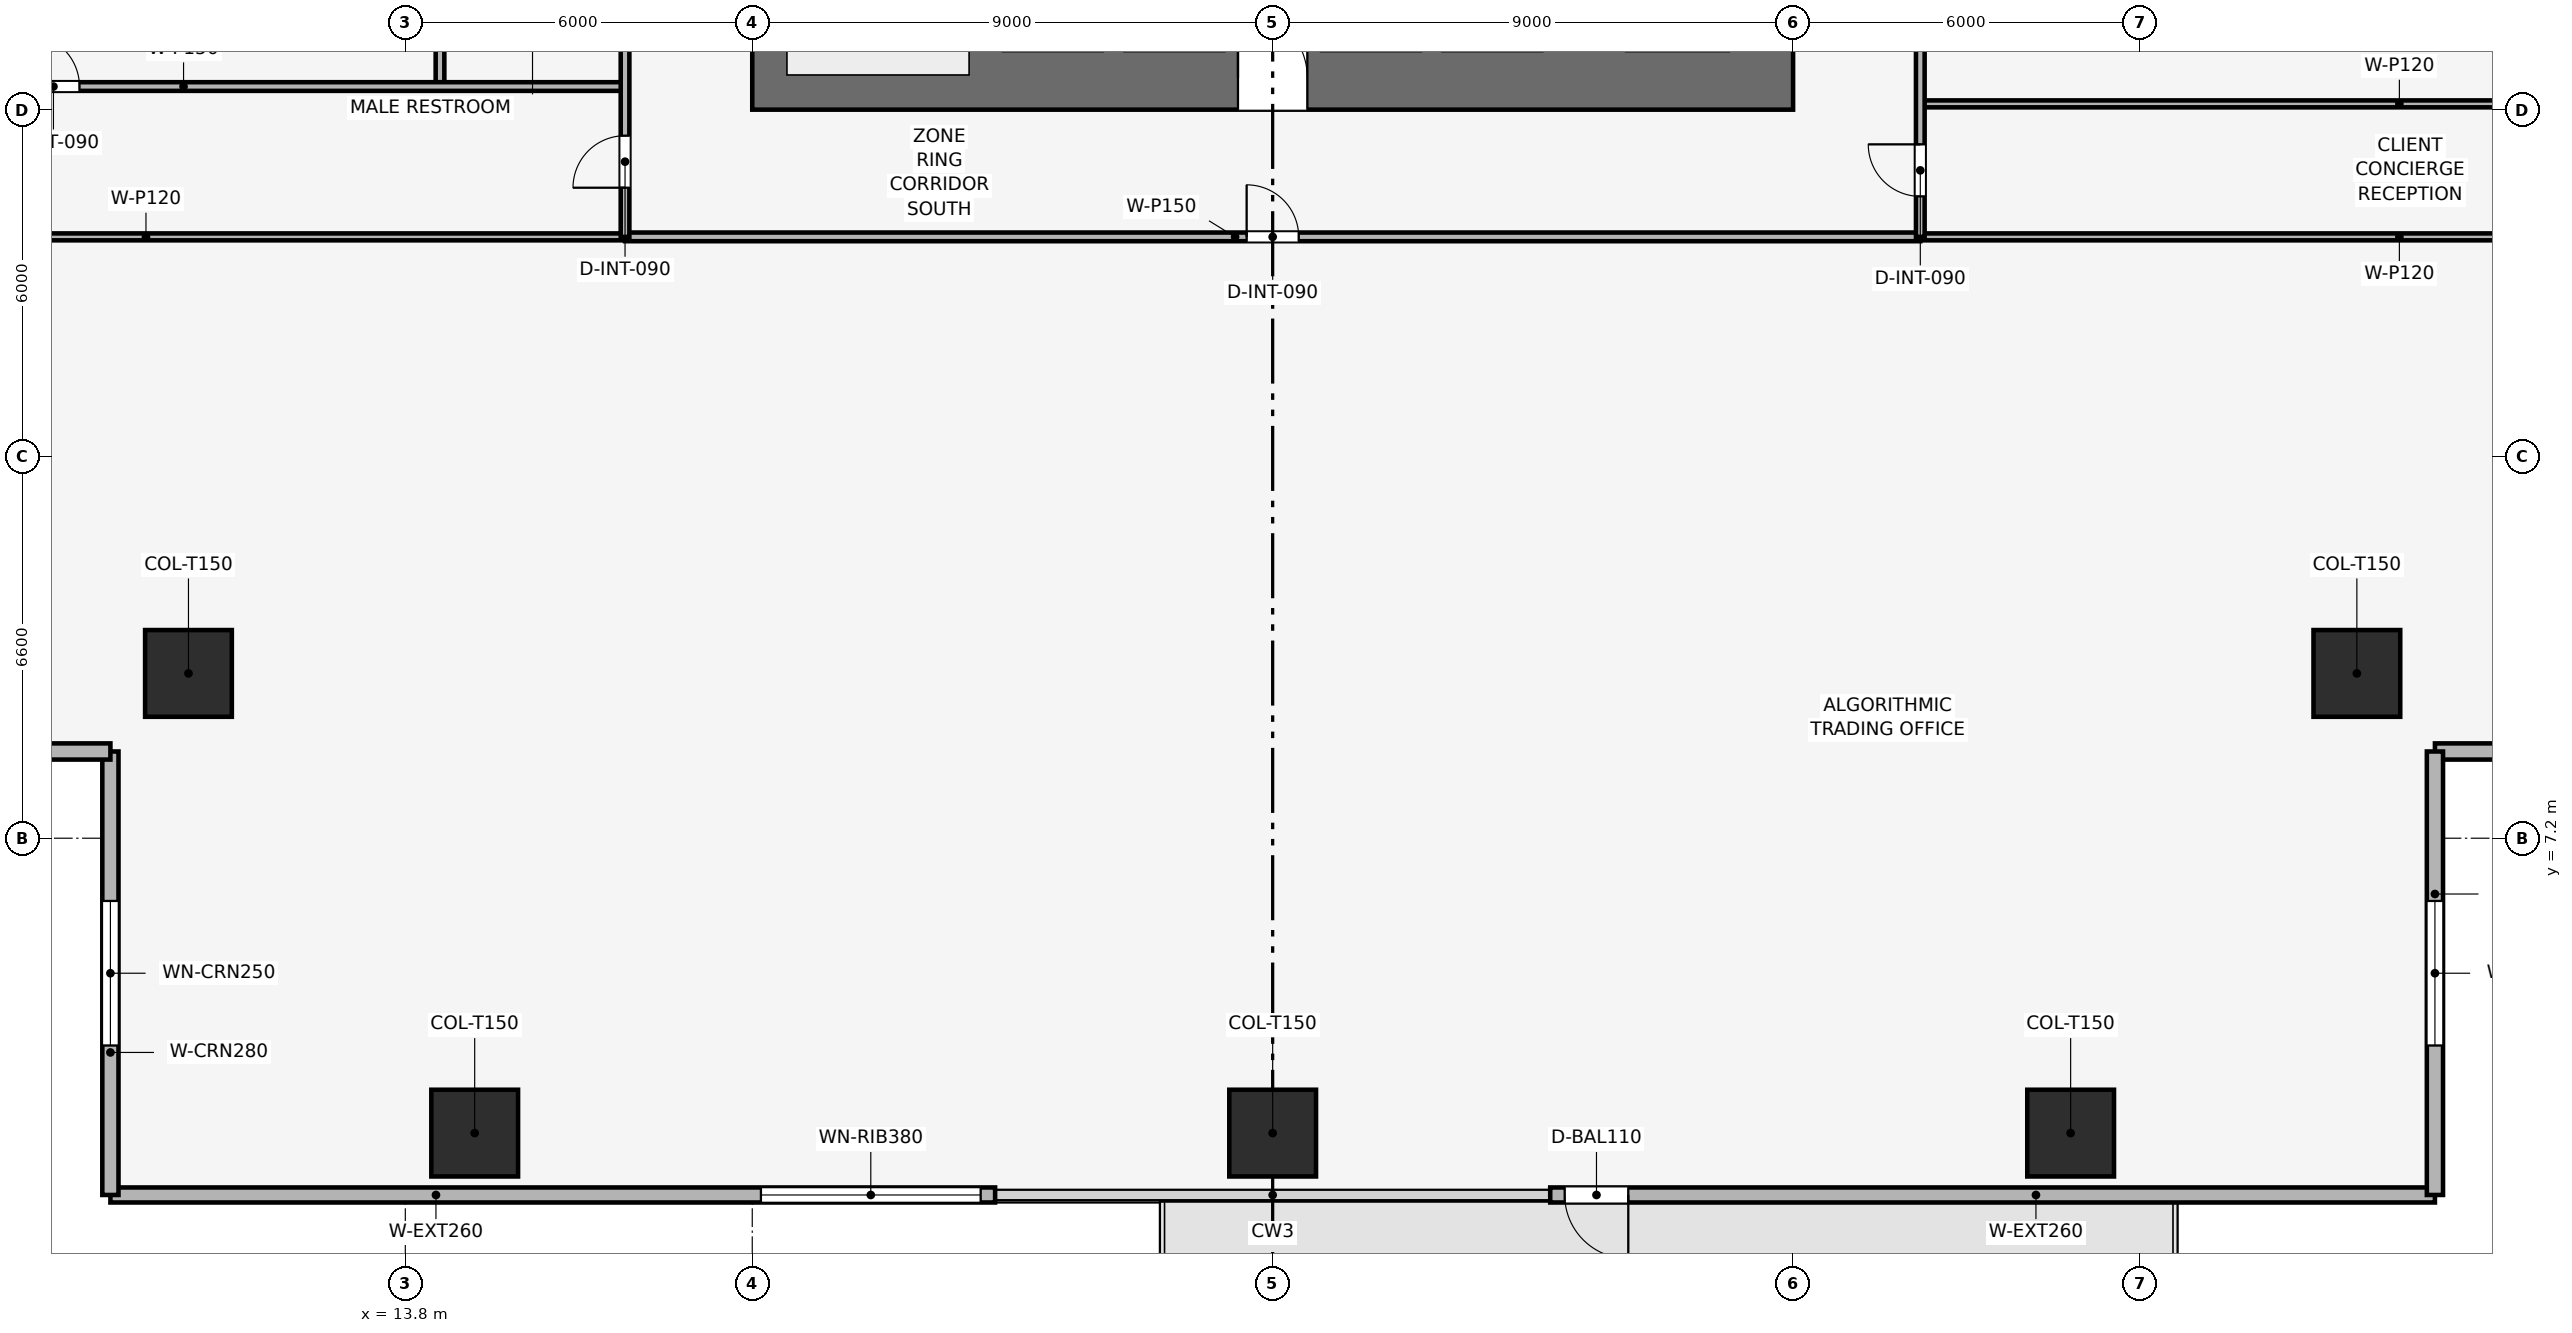
"""IFC4 building model, lengths in metres.
Left out: names, types, materials, properties, quantities, classifications, styles, units other than length and angle.
Written with IfcOpenShell. Run it as: python <this file> out.ifc"""

import sys

from ifc_helpers import new_model, si_unit, direction, frame, frame_2d, origin, origin_2d, place, context, subcontext, project, spatial, rectangle, extrude, element, fill, save


model = new_model("IFC4")
c1 = context("Model", 3, precision=1e-05, world=origin(), true_north=direction((0.0, 1.0)))
c2 = subcontext(c1, "Body", "Model", "MODEL_VIEW")
j1 = project(units=[si_unit("LENGTHUNIT", "METRE"), si_unit("PLANEANGLEUNIT", "RADIAN")], contexts=[c1])
p1 = place(None, origin())
s1 = spatial("IfcSite", under=j1, at=p1, CompositionType="ELEMENT")
p2 = place(p1, origin())
s2 = spatial("IfcBuilding", under=s1, at=p2, CompositionType="ELEMENT")
p3 = place(p2, frame((0.0, 0.0, 84.6)))
s3 = spatial("IfcBuildingStorey", under=s2, at=p3, CompositionType="ELEMENT", Elevation=84.6)
p4 = place(p3, frame((19.8, 20.35, 0.0), z_axis=(0.0, 0.0, 1.0), x_axis=(1.0, 0.0, 0.0)))
e1 = element("IfcWall", 1, at=p4, inside=s3, PredefinedType="SHEAR", context=c2, shape_type="SweptSolid", body=[
    extrude(rectangle(XDim=18.0, YDim=1.1, at=frame_2d((9.0, 0.0))), origin(), (0.0, 0.0, 1.0), 3.9),
])
p5 = place(p4, frame((8.4, 0.0, 0.0)))
e2 = element("IfcOpeningElement", 2, at=p5, cuts=e1, PredefinedType="OPENING", context=c2, shape_type="SweptSolid", body=[
    extrude(rectangle(XDim=1.2, YDim=2.2, at=frame_2d((0.6, 1.1))), frame((0.0, 0.56, 0.0), z_axis=(0.0, -1.0, 0.0), x_axis=(1.0, 0.0, 0.0)), (0.0, 0.0, 1.0), 1.12),
])
for number, where, z_axis, x_axis in (
    (3, (15.0, 2.1, 0.003), (0.0, 0.0, 1.0), (1.0, 0.0, 0.0)),
    (4, (28.8, 2.1, 0.003), (0.0, 0.0, 1.0), (1.0, 0.0, 0.0)),
    (5, (42.6, 2.1, 0.003), (0.0, 0.0, 1.0), (1.0, 0.0, 0.0)),
    (6, (10.05, 10.05, 0.003), (0.0, 0.0, 1.0), (1.0, 0.0, 0.0)),
    (7, (47.55, 10.05, 0.003), (0.0, 0.0, 1.0), (1.0, 0.0, 0.0)),
):
    element("IfcColumn", number, at=place(p3, frame(where, z_axis=z_axis, x_axis=x_axis)), inside=s3, PredefinedType="COLUMN", context=c2, shape_type="SweptSolid", body=[
        extrude(rectangle(XDim=1.5, YDim=1.5, at=origin_2d()), origin(), (0.0, 0.0, 1.0), 3.644),
    ])
p6 = place(p3, frame((48.9, 1.03, 0.0), z_axis=(0.0, 0.0, 1.0), x_axis=(-1.0, 0.0, 0.0)))
e8 = element("IfcWall", 8, at=p6, inside=s3, PredefinedType="SOLIDWALL", context=c2, shape_type="SweptSolid", body=[
    extrude(rectangle(XDim=15.3, YDim=0.26, at=frame_2d((7.65, 0.0))), origin(), (0.0, 0.0, 1.0), 3.65),
])
p7 = place(p6, frame((13.95, 0.0, 0.0)))
e9 = element("IfcOpeningElement", 9, at=p7, cuts=e8, PredefinedType="OPENING", context=c2, shape_type="SweptSolid", body=[
    extrude(rectangle(XDim=1.1, YDim=2.2, at=frame_2d((0.55, 1.1))), frame((0.0, 0.14, 0.0), z_axis=(0.0, -1.0, 0.0), x_axis=(1.0, 0.0, 0.0)), (0.0, 0.0, 1.0), 0.28),
])
p8 = place(p3, frame((24.0, 1.03, 0.0), z_axis=(0.0, 0.0, 1.0), x_axis=(-1.0, 0.0, 0.0)))
e10 = element("IfcWall", 10, at=p8, inside=s3, PredefinedType="SOLIDWALL", context=c2, shape_type="SweptSolid", body=[
    extrude(rectangle(XDim=15.3, YDim=0.26, at=frame_2d((7.65, 0.0))), origin(), (0.0, 0.0, 1.0), 3.65),
])
p9 = place(p8, frame((0.25, 0.0, 0.9)))
e11 = element("IfcOpeningElement", 11, at=p9, cuts=e10, PredefinedType="OPENING", context=c2, shape_type="SweptSolid", body=[
    extrude(rectangle(XDim=3.8, YDim=1.9, at=frame_2d((1.9, 0.95))), frame((0.0, 0.14, 0.0), z_axis=(0.0, -1.0, 0.0), x_axis=(1.0, 0.0, 0.0)), (0.0, 0.0, 1.0), 0.28),
])
p10 = place(p3, frame((8.7, 1.03, 0.0), z_axis=(0.0, 0.0, 1.0), x_axis=(0.0, 1.0, 0.0)))
e12 = element("IfcWall", 12, at=p10, inside=s3, PredefinedType="SOLIDWALL", context=c2, shape_type="SweptSolid", body=[
    extrude(rectangle(XDim=7.67, YDim=0.28, at=frame_2d((3.835, 0.0))), origin(), (0.0, 0.0, 1.0), 3.65),
])
p11 = place(p10, frame((2.585, 0.0, 0.9)))
e13 = element("IfcOpeningElement", 13, at=p11, cuts=e12, PredefinedType="OPENING", context=c2, shape_type="SweptSolid", body=[
    extrude(rectangle(XDim=2.5, YDim=1.9, at=frame_2d((1.25, 0.95))), frame((0.0, 0.15, 0.0), z_axis=(0.0, -1.0, 0.0), x_axis=(1.0, 0.0, 0.0)), (0.0, 0.0, 1.0), 0.3),
])
p12 = place(p3, frame((8.7, 8.7, 0.0), z_axis=(0.0, 0.0, 1.0), x_axis=(-1.0, 0.0, 0.0)))
e14 = element("IfcWall", 14, at=p12, inside=s3, PredefinedType="SOLIDWALL", context=c2, shape_type="SweptSolid", body=[
    extrude(rectangle(XDim=7.67, YDim=0.28, at=frame_2d((3.835, 0.0))), origin(), (0.0, 0.0, 1.0), 3.65),
])
p13 = place(p12, frame((2.585, 0.0, 0.9)))
e15 = element("IfcOpeningElement", 15, at=p13, cuts=e14, PredefinedType="OPENING", context=c2, shape_type="SweptSolid", body=[
    extrude(rectangle(XDim=2.5, YDim=1.9, at=frame_2d((1.25, 0.95))), frame((0.0, 0.15, 0.0), z_axis=(0.0, -1.0, 0.0), x_axis=(1.0, 0.0, 0.0)), (0.0, 0.0, 1.0), 0.3),
])
p14 = place(p3, frame((56.57, 8.7, 0.0), z_axis=(0.0, 0.0, 1.0), x_axis=(-1.0, 0.0, 0.0)))
e16 = element("IfcWall", 16, at=p14, inside=s3, PredefinedType="SOLIDWALL", context=c2, shape_type="SweptSolid", body=[
    extrude(rectangle(XDim=7.67, YDim=0.28, at=frame_2d((3.835, 0.0))), origin(), (0.0, 0.0, 1.0), 3.65),
])
p15 = place(p14, frame((2.585, 0.0, 0.9)))
e17 = element("IfcOpeningElement", 17, at=p15, cuts=e16, PredefinedType="OPENING", context=c2, shape_type="SweptSolid", body=[
    extrude(rectangle(XDim=2.5, YDim=1.9, at=frame_2d((1.25, 0.95))), frame((0.0, 0.15, 0.0), z_axis=(0.0, -1.0, 0.0), x_axis=(1.0, 0.0, 0.0)), (0.0, 0.0, 1.0), 0.3),
])
p16 = place(p3, frame((48.9, 8.7, 0.0), z_axis=(0.0, 0.0, 1.0), x_axis=(0.0, -1.0, 0.0)))
e18 = element("IfcWall", 18, at=p16, inside=s3, PredefinedType="SOLIDWALL", context=c2, shape_type="SweptSolid", body=[
    extrude(rectangle(XDim=7.67, YDim=0.28, at=frame_2d((3.835, 0.0))), origin(), (0.0, 0.0, 1.0), 3.65),
])
p17 = place(p16, frame((2.585, 0.0, 0.9)))
e19 = element("IfcOpeningElement", 19, at=p17, cuts=e18, PredefinedType="OPENING", context=c2, shape_type="SweptSolid", body=[
    extrude(rectangle(XDim=2.5, YDim=1.9, at=frame_2d((1.25, 0.95))), frame((0.0, 0.15, 0.0), z_axis=(0.0, -1.0, 0.0), x_axis=(1.0, 0.0, 0.0)), (0.0, 0.0, 1.0), 0.3),
])
for number, where, z_axis, x_axis in (
    (20, (1.03, 17.6, 0.0), (0.0, 0.0, 1.0), (1.0, 0.0, 0.0)),
    (21, (40.0, 17.6, 0.0), (0.0, 0.0, 1.0), (1.0, 0.0, 0.0)),
):
    element("IfcWall", number, at=place(p3, frame(where, z_axis=z_axis, x_axis=x_axis)), inside=s3, PredefinedType="PARTITIONING", context=c2, shape_type="SweptSolid", body=[
        extrude(rectangle(XDim=16.57, YDim=0.12, at=frame_2d((8.285, 0.0))), origin(), (0.0, 0.0, 1.0), 2.935),
    ])
p18 = place(p3, frame((14.4, 20.2, 0.0), z_axis=(0.0, 0.0, 1.0), x_axis=(0.0, 1.0, 0.0)))
e22 = element("IfcWall", 22, at=p18, inside=s3, PredefinedType="PARTITIONING", context=c2, shape_type="SweptSolid", body=[
    extrude(rectangle(XDim=8.4, YDim=0.15, at=frame_2d((4.2, 0.0))), origin(), (0.0, 0.0, 1.0), 3.085),
])
p19 = place(p3, frame((1.03, 20.2, 0.0), z_axis=(0.0, 0.0, 1.0), x_axis=(1.0, 0.0, 0.0)))
e23 = element("IfcWall", 23, at=p19, inside=s3, PredefinedType="PARTITIONING", context=c2, shape_type="SweptSolid", body=[
    extrude(rectangle(XDim=16.57, YDim=0.15, at=frame_2d((8.285, 0.0))), origin(), (0.0, 0.0, 1.0), 2.935),
])
p20 = place(p19, frame((6.235, 0.0, 0.0)))
e24 = element("IfcOpeningElement", 24, at=p20, cuts=e23, PredefinedType="OPENING", context=c2, shape_type="SweptSolid", body=[
    extrude(rectangle(XDim=0.9, YDim=2.1, at=frame_2d((0.45, 1.05))), frame((0.0, 0.085, 0.0), z_axis=(0.0, -1.0, 0.0), x_axis=(1.0, 0.0, 0.0)), (0.0, 0.0, 1.0), 0.17),
])
p21 = place(p3, frame((40.0, 19.9, 0.0), z_axis=(0.0, 0.0, 1.0), x_axis=(1.0, 0.0, 0.0)))
e25 = element("IfcWall", 25, at=p21, inside=s3, PredefinedType="PARTITIONING", context=c2, shape_type="SweptSolid", body=[
    extrude(rectangle(XDim=16.57, YDim=0.12, at=frame_2d((8.285, 0.0))), origin(), (0.0, 0.0, 1.0), 2.935),
])
p22 = place(p3, frame((17.6, 17.6, 0.0), z_axis=(0.0, 0.0, 1.0), x_axis=(1.0, 0.0, 0.0)))
e26 = element("IfcWall", 26, at=p22, inside=s3, PredefinedType="PARTITIONING", context=c2, shape_type="SweptSolid", body=[
    extrude(rectangle(XDim=22.4, YDim=0.15, at=frame_2d((11.2, 0.0))), origin(), (0.0, 0.0, 1.0), 3.085),
])
p23 = place(p22, frame((10.75, 0.0, 0.0)))
e27 = element("IfcOpeningElement", 27, at=p23, cuts=e26, PredefinedType="OPENING", context=c2, shape_type="SweptSolid", body=[
    extrude(rectangle(XDim=0.9, YDim=2.1, at=frame_2d((0.45, 1.05))), frame((0.0, 0.085, 0.0), z_axis=(0.0, -1.0, 0.0), x_axis=(1.0, 0.0, 0.0)), (0.0, 0.0, 1.0), 0.17),
])
p24 = place(p3, frame((17.6, 17.6, 0.0), z_axis=(0.0, 0.0, 1.0), x_axis=(0.0, 1.0, 0.0)))
e28 = element("IfcWall", 28, at=p24, inside=s3, PredefinedType="PARTITIONING", context=c2, shape_type="SweptSolid", body=[
    extrude(rectangle(XDim=22.4, YDim=0.15, at=frame_2d((11.2, 0.0))), origin(), (0.0, 0.0, 1.0), 3.085),
])
p25 = place(p24, frame((0.85, 0.0, 0.0)))
e29 = element("IfcOpeningElement", 29, at=p25, cuts=e28, PredefinedType="OPENING", context=c2, shape_type="SweptSolid", body=[
    extrude(rectangle(XDim=0.9, YDim=2.1, at=frame_2d((0.45, 1.05))), frame((0.0, 0.085, 0.0), z_axis=(0.0, -1.0, 0.0), x_axis=(1.0, 0.0, 0.0)), (0.0, 0.0, 1.0), 0.17),
])
p26 = place(p24, frame((3.55, 0.0, 0.0)))
e30 = element("IfcOpeningElement", 30, at=p26, cuts=e28, PredefinedType="OPENING", context=c2, shape_type="SweptSolid", body=[
    extrude(rectangle(XDim=0.9, YDim=2.1, at=frame_2d((0.45, 1.05))), frame((0.0, 0.085, 0.0), z_axis=(0.0, -1.0, 0.0), x_axis=(1.0, 0.0, 0.0)), (0.0, 0.0, 1.0), 0.17),
])
p27 = place(p24, frame((6.45, 0.0, 0.0)))
e31 = element("IfcOpeningElement", 31, at=p27, cuts=e28, PredefinedType="OPENING", context=c2, shape_type="SweptSolid", body=[
    extrude(rectangle(XDim=0.9, YDim=2.1, at=frame_2d((0.45, 1.05))), frame((0.0, 0.085, 0.0), z_axis=(0.0, -1.0, 0.0), x_axis=(1.0, 0.0, 0.0)), (0.0, 0.0, 1.0), 0.17),
])
p28 = place(p24, frame((9.2, 0.0, 0.0)))
e32 = element("IfcOpeningElement", 32, at=p28, cuts=e28, PredefinedType="OPENING", context=c2, shape_type="SweptSolid", body=[
    extrude(rectangle(XDim=0.95, YDim=2.1, at=frame_2d((0.475, 1.05))), frame((0.0, 0.085, 0.0), z_axis=(0.0, -1.0, 0.0), x_axis=(1.0, 0.0, 0.0)), (0.0, 0.0, 1.0), 0.17),
])
p29 = place(p24, frame((16.25, 0.0, 0.0)))
e33 = element("IfcOpeningElement", 33, at=p29, cuts=e28, PredefinedType="OPENING", context=c2, shape_type="SweptSolid", body=[
    extrude(rectangle(XDim=0.9, YDim=2.1, at=frame_2d((0.45, 1.05))), frame((0.0, 0.085, 0.0), z_axis=(0.0, -1.0, 0.0), x_axis=(1.0, 0.0, 0.0)), (0.0, 0.0, 1.0), 0.17),
])
p30 = place(p3, frame((40.0, 17.6, 0.0), z_axis=(0.0, 0.0, 1.0), x_axis=(0.0, 1.0, 0.0)))
e34 = element("IfcWall", 34, at=p30, inside=s3, PredefinedType="PARTITIONING", context=c2, shape_type="SweptSolid", body=[
    extrude(rectangle(XDim=22.4, YDim=0.15, at=frame_2d((11.2, 0.0))), origin(), (0.0, 0.0, 1.0), 3.085),
])
p31 = place(p30, frame((0.7, 0.0, 0.0)))
e35 = element("IfcOpeningElement", 35, at=p31, cuts=e34, PredefinedType="OPENING", context=c2, shape_type="SweptSolid", body=[
    extrude(rectangle(XDim=0.9, YDim=2.1, at=frame_2d((0.45, 1.05))), frame((0.0, 0.085, 0.0), z_axis=(0.0, -1.0, 0.0), x_axis=(1.0, 0.0, 0.0)), (0.0, 0.0, 1.0), 0.17),
])
p32 = place(p30, frame((6.404, 0.0, 0.0)))
e36 = element("IfcOpeningElement", 36, at=p32, cuts=e34, PredefinedType="OPENING", context=c2, shape_type="SweptSolid", body=[
    extrude(rectangle(XDim=0.9, YDim=2.1, at=frame_2d((0.45, 1.05))), frame((0.0, 0.085, 0.0), z_axis=(0.0, -1.0, 0.0), x_axis=(1.0, 0.0, 0.0)), (0.0, 0.0, 1.0), 0.17),
])
p33 = place(p30, frame((16.454, 0.0, 0.0)))
e37 = element("IfcOpeningElement", 37, at=p33, cuts=e34, PredefinedType="OPENING", context=c2, shape_type="SweptSolid", body=[
    extrude(rectangle(XDim=0.9, YDim=2.1, at=frame_2d((0.45, 1.05))), frame((0.0, 0.085, 0.0), z_axis=(0.0, -1.0, 0.0), x_axis=(1.0, 0.0, 0.0)), (0.0, 0.0, 1.0), 0.17),
])
p34 = place(p7, origin())
e38 = element("IfcDoor", 38, at=p34, inside=s3, OperationType="SINGLE_SWING_LEFT", PredefinedType="DOOR", context=c2, shape_type="SweptSolid", body=[
    extrude(rectangle(XDim=1.1, YDim=2.2, at=frame_2d((0.55, 1.1))), frame((0.0, 0.025, 0.0), z_axis=(0.0, -1.0, 0.0), x_axis=(1.0, 0.0, 0.0)), (0.0, 0.0, 1.0), 0.05),
])
fill(e9, e38)
p35 = place(p9, origin())
e39 = element("IfcWindow", 39, at=p35, inside=s3, PartitioningType="SINGLE_PANEL", PredefinedType="WINDOW", context=c2, shape_type="SweptSolid", body=[
    extrude(rectangle(XDim=3.8, YDim=1.9, at=frame_2d((1.9, 0.95))), frame((0.0, 0.03, 0.0), z_axis=(0.0, -1.0, 0.0), x_axis=(1.0, 0.0, 0.0)), (0.0, 0.0, 1.0), 0.06),
])
fill(e11, e39)
p36 = place(p11, origin())
e40 = element("IfcWindow", 40, at=p36, inside=s3, PartitioningType="SINGLE_PANEL", PredefinedType="WINDOW", context=c2, shape_type="SweptSolid", body=[
    extrude(rectangle(XDim=2.5, YDim=1.9, at=frame_2d((1.25, 0.95))), frame((0.0, 0.03, 0.0), z_axis=(0.0, -1.0, 0.0), x_axis=(1.0, 0.0, 0.0)), (0.0, 0.0, 1.0), 0.06),
])
fill(e13, e40)
p37 = place(p17, origin())
e41 = element("IfcWindow", 41, at=p37, inside=s3, PartitioningType="SINGLE_PANEL", PredefinedType="WINDOW", context=c2, shape_type="SweptSolid", body=[
    extrude(rectangle(XDim=2.5, YDim=1.9, at=frame_2d((1.25, 0.95))), frame((0.0, 0.03, 0.0), z_axis=(0.0, -1.0, 0.0), x_axis=(1.0, 0.0, 0.0)), (0.0, 0.0, 1.0), 0.06),
])
fill(e19, e41)
p38 = place(p20, origin())
e42 = element("IfcDoor", 42, at=p38, inside=s3, OperationType="SINGLE_SWING_LEFT", PredefinedType="DOOR", context=c2, shape_type="SweptSolid", body=[
    extrude(rectangle(XDim=0.9, YDim=2.1, at=frame_2d((0.45, 1.05))), frame((0.0, 0.025, 0.0), z_axis=(0.0, -1.0, 0.0), x_axis=(1.0, 0.0, 0.0)), (0.0, 0.0, 1.0), 0.05),
])
fill(e24, e42)
p39 = place(p23, origin())
e43 = element("IfcDoor", 43, at=p39, inside=s3, OperationType="SINGLE_SWING_LEFT", PredefinedType="DOOR", context=c2, shape_type="SweptSolid", body=[
    extrude(rectangle(XDim=0.9, YDim=2.1, at=frame_2d((0.45, 1.05))), frame((0.0, 0.025, 0.0), z_axis=(0.0, -1.0, 0.0), x_axis=(1.0, 0.0, 0.0)), (0.0, 0.0, 1.0), 0.05),
])
fill(e27, e43)
p40 = place(p25, origin())
e44 = element("IfcDoor", 44, at=p40, inside=s3, OperationType="SINGLE_SWING_LEFT", PredefinedType="DOOR", context=c2, shape_type="SweptSolid", body=[
    extrude(rectangle(XDim=0.9, YDim=2.1, at=frame_2d((0.45, 1.05))), frame((0.0, 0.025, 0.0), z_axis=(0.0, -1.0, 0.0), x_axis=(1.0, 0.0, 0.0)), (0.0, 0.0, 1.0), 0.05),
])
fill(e29, e44)
p41 = place(p31, origin())
e45 = element("IfcDoor", 45, at=p41, inside=s3, OperationType="SINGLE_SWING_RIGHT", PredefinedType="DOOR", context=c2, shape_type="SweptSolid", body=[
    extrude(rectangle(XDim=0.9, YDim=2.1, at=frame_2d((0.45, 1.05))), frame((0.0, 0.025, 0.0), z_axis=(0.0, -1.0, 0.0), x_axis=(1.0, 0.0, 0.0)), (0.0, 0.0, 1.0), 0.05),
])
fill(e35, e45)
p42 = place(p5, origin())
e46 = element("IfcDoor", 46, at=p42, inside=s3, OperationType="SINGLE_SWING_LEFT", PredefinedType="DOOR", context=c2, shape_type="SweptSolid", body=[
    extrude(rectangle(XDim=1.2, YDim=2.2, at=frame_2d((0.6, 1.1))), frame((0.0, 0.025, 0.0), z_axis=(0.0, -1.0, 0.0), x_axis=(1.0, 0.0, 0.0)), (0.0, 0.0, 1.0), 0.05),
])
fill(e2, e46)
save(model, sys.argv[1])
